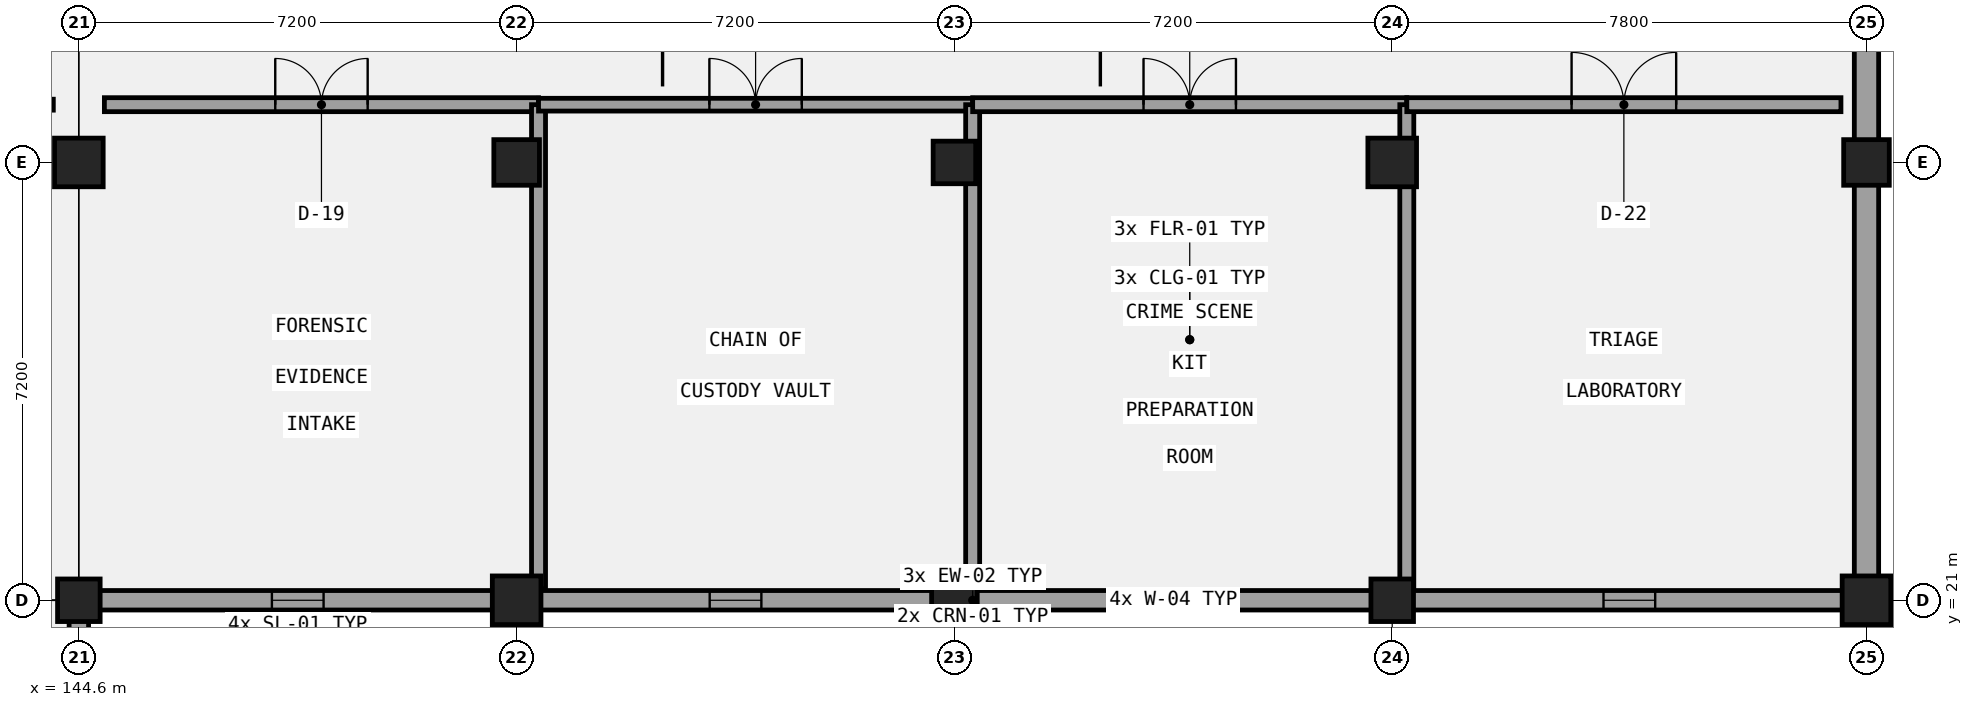
"""IFC4 building model, lengths in metres.
Left out: names, types, materials, properties, quantities, classifications, styles, units other than length and angle.
Written with IfcOpenShell. Run it as: python <this file> out.ifc"""

import sys

from ifc_helpers import new_model, si_unit, direction, frame, frame_2d, origin, origin_2d, place, context, subcontext, project, spatial, rectangle, extrude, element, fill, save


model = new_model("IFC4")
c1 = context("Model", 3, precision=1e-05, world=origin(), true_north=direction((0.0, 1.0)))
c2 = subcontext(c1, "Body", "Model", "MODEL_VIEW")
j1 = project(units=[si_unit("LENGTHUNIT", "METRE"), si_unit("PLANEANGLEUNIT", "RADIAN")], contexts=[c1])
p1 = place(None, origin())
s1 = spatial("IfcSite", under=j1, at=p1, CompositionType="ELEMENT")
p2 = place(p1, origin())
s2 = spatial("IfcBuilding", under=s1, at=p2, CompositionType="ELEMENT")
p3 = place(p2, origin())
s3 = spatial("IfcBuildingStorey", under=s2, at=p3, CompositionType="ELEMENT", Elevation=0.0)
p4 = place(p3, frame((144.6, 21.0, 0.0), z_axis=(0.0, 0.0, 1.0), x_axis=(1.0, 0.0, 0.0)))
e1 = element("IfcColumn", 1, at=p4, inside=s3, PredefinedType="COLUMN", context=c2, shape_type="SweptSolid", body=[
    extrude(rectangle(XDim=0.7, YDim=0.7, at=origin_2d()), origin(), (0.0, 0.0, 1.0), 5.4),
])
p5 = place(p3, frame((144.6, 28.2, 0.0), z_axis=(0.0, 0.0, 1.0), x_axis=(1.0, 0.0, 0.0)))
e2 = element("IfcColumn", 2, at=p5, inside=s3, PredefinedType="COLUMN", context=c2, shape_type="SweptSolid", body=[
    extrude(rectangle(XDim=0.8, YDim=0.8, at=origin_2d()), origin(), (0.0, 0.0, 1.0), 5.4),
])
p6 = place(p3, frame((151.8, 21.0, -0.32), z_axis=(0.0, 0.0, 1.0), x_axis=(1.0, 0.0, 0.0)))
e3 = element("IfcColumn", 3, at=p6, inside=s3, PredefinedType="COLUMN", context=c2, shape_type="SweptSolid", body=[
    extrude(rectangle(XDim=0.8, YDim=0.8, at=origin_2d()), origin(), (0.0, 0.0, 1.0), 5.72),
])
p7 = place(p3, frame((151.8, 28.2, 0.0), z_axis=(0.0, 0.0, 1.0), x_axis=(1.0, 0.0, 0.0)))
e4 = element("IfcColumn", 4, at=p7, inside=s3, PredefinedType="COLUMN", context=c2, shape_type="SweptSolid", body=[
    extrude(rectangle(XDim=0.75, YDim=0.75, at=origin_2d()), origin(), (0.0, 0.0, 1.0), 5.4),
])
p8 = place(p3, frame((159.0, 21.0, -0.32), z_axis=(0.0, 0.0, 1.0), x_axis=(1.0, 0.0, 0.0)))
e5 = element("IfcColumn", 5, at=p8, inside=s3, PredefinedType="COLUMN", context=c2, shape_type="SweptSolid", body=[
    extrude(rectangle(XDim=0.75, YDim=0.75, at=origin_2d()), origin(), (0.0, 0.0, 1.0), 5.72),
])
p9 = place(p3, frame((159.0, 28.2, 0.0), z_axis=(0.0, 0.0, 1.0), x_axis=(1.0, 0.0, 0.0)))
e6 = element("IfcColumn", 6, at=p9, inside=s3, PredefinedType="COLUMN", context=c2, shape_type="SweptSolid", body=[
    extrude(rectangle(XDim=0.7, YDim=0.7, at=origin_2d()), origin(), (0.0, 0.0, 1.0), 5.4),
])
p10 = place(p3, frame((166.2, 21.0, -0.32), z_axis=(0.0, 0.0, 1.0), x_axis=(1.0, 0.0, 0.0)))
e7 = element("IfcColumn", 7, at=p10, inside=s3, PredefinedType="COLUMN", context=c2, shape_type="SweptSolid", body=[
    extrude(rectangle(XDim=0.7, YDim=0.7, at=origin_2d()), origin(), (0.0, 0.0, 1.0), 5.72),
])
p11 = place(p3, frame((166.2, 28.2, 0.0), z_axis=(0.0, 0.0, 1.0), x_axis=(1.0, 0.0, 0.0)))
e8 = element("IfcColumn", 8, at=p11, inside=s3, PredefinedType="COLUMN", context=c2, shape_type="SweptSolid", body=[
    extrude(rectangle(XDim=0.8, YDim=0.8, at=origin_2d()), origin(), (0.0, 0.0, 1.0), 5.4),
])
p12 = place(p3, frame((174.0, 21.0, -0.32), z_axis=(0.0, 0.0, 1.0), x_axis=(1.0, 0.0, 0.0)))
e9 = element("IfcColumn", 9, at=p12, inside=s3, PredefinedType="COLUMN", context=c2, shape_type="SweptSolid", body=[
    extrude(rectangle(XDim=0.8, YDim=0.8, at=origin_2d()), origin(), (0.0, 0.0, 1.0), 5.72),
])
p13 = place(p3, frame((174.0, 28.2, -0.32), z_axis=(0.0, 0.0, 1.0), x_axis=(1.0, 0.0, 0.0)))
e10 = element("IfcColumn", 10, at=p13, inside=s3, PredefinedType="COLUMN", context=c2, shape_type="SweptSolid", body=[
    extrude(rectangle(XDim=0.75, YDim=0.75, at=origin_2d()), origin(), (0.0, 0.0, 1.0), 5.72),
])
p14 = place(p3, frame((144.6, 0.16, 0.0), z_axis=(0.0, 0.0, 1.0), x_axis=(0.0, 1.0, 0.0)))
e11 = element("IfcWall", 11, at=p14, inside=s3, PredefinedType="SOLIDWALL", context=c2, shape_type="SweptSolid", body=[
    extrude(rectangle(XDim=20.68, YDim=0.32, at=frame_2d((10.34, 0.0))), origin(), (0.0, 0.0, 1.0), 4.12),
])
p15 = place(p14, frame((9.34, 0.0, 0.0)))
e12 = element("IfcOpeningElement", 12, at=p15, cuts=e11, PredefinedType="OPENING", context=c2, shape_type="SweptSolid", body=[
    extrude(rectangle(XDim=2.0, YDim=2.6, at=frame_2d((1.0, 1.3))), frame((0.0, 0.17, 0.0), z_axis=(0.0, -1.0, 0.0), x_axis=(1.0, 0.0, 0.0)), (0.0, 0.0, 1.0), 0.34),
])
p16 = place(p14, frame((2.795, 0.0, 1.0)))
e13 = element("IfcOpeningElement", 13, at=p16, cuts=e11, PredefinedType="OPENING", context=c2, shape_type="SweptSolid", body=[
    extrude(rectangle(XDim=0.85, YDim=1.9, at=frame_2d((0.425, 0.95))), frame((0.0, 0.17, 0.0), z_axis=(0.0, -1.0, 0.0), x_axis=(1.0, 0.0, 0.0)), (0.0, 0.0, 1.0), 0.34),
])
p17 = place(p14, frame((16.735, 0.0, 1.0)))
e14 = element("IfcOpeningElement", 14, at=p17, cuts=e11, PredefinedType="OPENING", context=c2, shape_type="SweptSolid", body=[
    extrude(rectangle(XDim=0.85, YDim=1.9, at=frame_2d((0.425, 0.95))), frame((0.0, 0.17, 0.0), z_axis=(0.0, -1.0, 0.0), x_axis=(1.0, 0.0, 0.0)), (0.0, 0.0, 1.0), 0.34),
])
p18 = place(p3, frame((144.44, 21.0, 0.0), z_axis=(0.0, 0.0, 1.0), x_axis=(1.0, 0.0, 0.0)))
e15 = element("IfcWall", 15, at=p18, inside=s3, PredefinedType="SOLIDWALL", context=c2, shape_type="SweptSolid", body=[
    extrude(rectangle(XDim=29.72, YDim=0.32, at=frame_2d((14.86, 0.0))), origin(), (0.0, 0.0, 1.0), 3.35),
])
p19 = place(p18, frame((3.335, 0.0, 1.0)))
e16 = element("IfcOpeningElement", 16, at=p19, cuts=e15, PredefinedType="OPENING", context=c2, shape_type="SweptSolid", body=[
    extrude(rectangle(XDim=0.85, YDim=2.15, at=frame_2d((0.425, 1.075))), frame((0.0, 0.17, 0.0), z_axis=(0.0, -1.0, 0.0), x_axis=(1.0, 0.0, 0.0)), (0.0, 0.0, 1.0), 0.34),
])
p20 = place(p18, frame((10.535, 0.0, 1.0)))
e17 = element("IfcOpeningElement", 17, at=p20, cuts=e15, PredefinedType="OPENING", context=c2, shape_type="SweptSolid", body=[
    extrude(rectangle(XDim=0.85, YDim=2.15, at=frame_2d((0.425, 1.075))), frame((0.0, 0.17, 0.0), z_axis=(0.0, -1.0, 0.0), x_axis=(1.0, 0.0, 0.0)), (0.0, 0.0, 1.0), 0.34),
])
p21 = place(p18, frame((17.735, 0.0, 1.0)))
e18 = element("IfcOpeningElement", 18, at=p21, cuts=e15, PredefinedType="OPENING", context=c2, shape_type="SweptSolid", body=[
    extrude(rectangle(XDim=0.85, YDim=2.15, at=frame_2d((0.425, 1.075))), frame((0.0, 0.17, 0.0), z_axis=(0.0, -1.0, 0.0), x_axis=(1.0, 0.0, 0.0)), (0.0, 0.0, 1.0), 0.34),
])
p22 = place(p18, frame((25.235, 0.0, 1.0)))
e19 = element("IfcOpeningElement", 19, at=p22, cuts=e15, PredefinedType="OPENING", context=c2, shape_type="SweptSolid", body=[
    extrude(rectangle(XDim=0.85, YDim=2.15, at=frame_2d((0.425, 1.075))), frame((0.0, 0.17, 0.0), z_axis=(0.0, -1.0, 0.0), x_axis=(1.0, 0.0, 0.0)), (0.0, 0.0, 1.0), 0.34),
])
p23 = place(p3, frame((174.0, 21.2, 0.0), z_axis=(0.0, 0.0, 1.0), x_axis=(0.0, 1.0, 0.0)))
e20 = element("IfcWall", 20, at=p23, inside=s3, PredefinedType="SOLIDWALL", context=c2, shape_type="SweptSolid", body=[
    extrude(rectangle(XDim=57.2, YDim=0.4, at=frame_2d((28.6, 0.0))), origin(), (0.0, 0.0, 1.0), 4.37),
])
p24 = place(p3, frame((137.133, 29.15, 0.0), z_axis=(0.0, 0.0, 1.0), x_axis=(1.0, 0.0, 0.0)))
e21 = element("IfcWall", 21, at=p24, inside=s3, PredefinedType="PARTITIONING", context=c2, shape_type="SweptSolid", body=[
    extrude(rectangle(XDim=7.047, YDim=0.18, at=frame_2d((3.523, 0.0))), origin(), (0.0, 0.0, 1.0), 5.12),
])
p25 = place(p24, frame((2.844, 0.0, 0.0)))
e22 = element("IfcOpeningElement", 22, at=p25, cuts=e21, PredefinedType="OPENING", context=c2, shape_type="SweptSolid", body=[
    extrude(rectangle(XDim=1.36, YDim=2.22, at=frame_2d((0.68, 1.11))), frame((0.0, 0.1, 0.0), z_axis=(0.0, -1.0, 0.0), x_axis=(1.0, 0.0, 0.0)), (0.0, 0.0, 1.0), 0.2),
])
p26 = place(p3, frame((145.02, 29.15, 0.0), z_axis=(0.0, 0.0, 1.0), x_axis=(1.0, 0.0, 0.0)))
e23 = element("IfcWall", 23, at=p26, inside=s3, PredefinedType="PARTITIONING", context=c2, shape_type="SweptSolid", body=[
    extrude(rectangle(XDim=7.14, YDim=0.23, at=frame_2d((3.57, 0.0))), origin(), (0.0, 0.0, 1.0), 5.12),
])
p27 = place(p26, frame((2.81, 0.0, 0.0)))
e24 = element("IfcOpeningElement", 24, at=p27, cuts=e23, PredefinedType="OPENING", context=c2, shape_type="SweptSolid", body=[
    extrude(rectangle(XDim=1.52, YDim=2.1, at=frame_2d((0.76, 1.05))), frame((0.0, 0.125, 0.0), z_axis=(0.0, -1.0, 0.0), x_axis=(1.0, 0.0, 0.0)), (0.0, 0.0, 1.0), 0.25),
])
p28 = place(p3, frame((152.16, 21.18, 0.0), z_axis=(0.0, 0.0, 1.0), x_axis=(0.0, 1.0, 0.0)))
e25 = element("IfcWall", 25, at=p28, inside=s3, PredefinedType="PARTITIONING", context=c2, shape_type="SweptSolid", body=[
    extrude(rectangle(XDim=7.97, YDim=0.23, at=frame_2d((3.985, 0.0))), origin(), (0.0, 0.0, 1.0), 4.47),
])
p29 = place(p3, frame((152.16, 29.15, 0.0), z_axis=(0.0, 0.0, 1.0), x_axis=(1.0, 0.0, 0.0)))
e26 = element("IfcWall", 26, at=p29, inside=s3, PredefinedType="PARTITIONING", context=c2, shape_type="SweptSolid", body=[
    extrude(rectangle(XDim=7.14, YDim=0.21, at=frame_2d((3.57, 0.0))), origin(), (0.0, 0.0, 1.0), 5.12),
])
p30 = place(p29, frame((2.81, 0.0, 0.0)))
e27 = element("IfcOpeningElement", 27, at=p30, cuts=e26, PredefinedType="OPENING", context=c2, shape_type="SweptSolid", body=[
    extrude(rectangle(XDim=1.52, YDim=2.22, at=frame_2d((0.76, 1.11))), frame((0.0, 0.115, 0.0), z_axis=(0.0, -1.0, 0.0), x_axis=(1.0, 0.0, 0.0)), (0.0, 0.0, 1.0), 0.23),
])
p31 = place(p3, frame((159.3, 21.18, 0.0), z_axis=(0.0, 0.0, 1.0), x_axis=(0.0, 1.0, 0.0)))
e28 = element("IfcWall", 28, at=p31, inside=s3, PredefinedType="PARTITIONING", context=c2, shape_type="SweptSolid", body=[
    extrude(rectangle(XDim=7.97, YDim=0.23, at=frame_2d((3.985, 0.0))), origin(), (0.0, 0.0, 1.0), 4.37),
])
p32 = place(p3, frame((159.3, 29.15, 0.0), z_axis=(0.0, 0.0, 1.0), x_axis=(1.0, 0.0, 0.0)))
e29 = element("IfcWall", 29, at=p32, inside=s3, PredefinedType="PARTITIONING", context=c2, shape_type="SweptSolid", body=[
    extrude(rectangle(XDim=7.14, YDim=0.23, at=frame_2d((3.57, 0.0))), origin(), (0.0, 0.0, 1.0), 5.12),
])
p33 = place(p32, frame((2.81, 0.0, 0.0)))
e30 = element("IfcOpeningElement", 30, at=p33, cuts=e29, PredefinedType="OPENING", context=c2, shape_type="SweptSolid", body=[
    extrude(rectangle(XDim=1.52, YDim=2.35, at=frame_2d((0.76, 1.175))), frame((0.0, 0.125, 0.0), z_axis=(0.0, -1.0, 0.0), x_axis=(1.0, 0.0, 0.0)), (0.0, 0.0, 1.0), 0.25),
])
p34 = place(p3, frame((166.44, 21.18, 0.0), z_axis=(0.0, 0.0, 1.0), x_axis=(0.0, 1.0, 0.0)))
e31 = element("IfcWall", 31, at=p34, inside=s3, PredefinedType="PARTITIONING", context=c2, shape_type="SweptSolid", body=[
    extrude(rectangle(XDim=7.97, YDim=0.23, at=frame_2d((3.985, 0.0))), origin(), (0.0, 0.0, 1.0), 4.32),
])
p35 = place(p3, frame((166.44, 29.15, 0.0), z_axis=(0.0, 0.0, 1.0), x_axis=(1.0, 0.0, 0.0)))
e32 = element("IfcWall", 32, at=p35, inside=s3, PredefinedType="PARTITIONING", context=c2, shape_type="SweptSolid", body=[
    extrude(rectangle(XDim=7.14, YDim=0.23, at=frame_2d((3.57, 0.0))), origin(), (0.0, 0.0, 1.0), 5.12),
])
p36 = place(p35, frame((2.71, 0.0, 0.0)))
e33 = element("IfcOpeningElement", 33, at=p36, cuts=e32, PredefinedType="OPENING", context=c2, shape_type="SweptSolid", body=[
    extrude(rectangle(XDim=1.72, YDim=2.1, at=frame_2d((0.86, 1.05))), frame((0.0, 0.125, 0.0), z_axis=(0.0, -1.0, 0.0), x_axis=(1.0, 0.0, 0.0)), (0.0, 0.0, 1.0), 0.25),
])
p37 = place(p19, origin())
e34 = element("IfcWindow", 34, at=p37, inside=s3, PartitioningType="SINGLE_PANEL", PredefinedType="WINDOW", context=c2, shape_type="SweptSolid", body=[
    extrude(rectangle(XDim=0.85, YDim=2.15, at=frame_2d((0.425, 1.075))), frame((0.0, 0.03, 0.0), z_axis=(0.0, -1.0, 0.0), x_axis=(1.0, 0.0, 0.0)), (0.0, 0.0, 1.0), 0.06),
])
fill(e16, e34)
p38 = place(p20, origin())
e35 = element("IfcWindow", 35, at=p38, inside=s3, PartitioningType="SINGLE_PANEL", PredefinedType="WINDOW", context=c2, shape_type="SweptSolid", body=[
    extrude(rectangle(XDim=0.85, YDim=2.15, at=frame_2d((0.425, 1.075))), frame((0.0, 0.03, 0.0), z_axis=(0.0, -1.0, 0.0), x_axis=(1.0, 0.0, 0.0)), (0.0, 0.0, 1.0), 0.06),
])
fill(e17, e35)
p39 = place(p21, origin())
e36 = element("IfcWindow", 36, at=p39, inside=s3, PartitioningType="SINGLE_PANEL", PredefinedType="WINDOW", context=c2, shape_type="SweptSolid", body=[
    extrude(rectangle(XDim=0.85, YDim=2.15, at=frame_2d((0.425, 1.075))), frame((0.0, 0.03, 0.0), z_axis=(0.0, -1.0, 0.0), x_axis=(1.0, 0.0, 0.0)), (0.0, 0.0, 1.0), 0.06),
])
fill(e18, e36)
p40 = place(p22, origin())
e37 = element("IfcWindow", 37, at=p40, inside=s3, PartitioningType="SINGLE_PANEL", PredefinedType="WINDOW", context=c2, shape_type="SweptSolid", body=[
    extrude(rectangle(XDim=0.85, YDim=2.15, at=frame_2d((0.425, 1.075))), frame((0.0, 0.03, 0.0), z_axis=(0.0, -1.0, 0.0), x_axis=(1.0, 0.0, 0.0)), (0.0, 0.0, 1.0), 0.06),
])
fill(e19, e37)
p41 = place(p27, frame((1.52, 0.0, 0.0), z_axis=(0.0, 0.0, 1.0), x_axis=(-1.0, 0.0, 0.0)))
e38 = element("IfcDoor", 38, at=p41, inside=s3, OperationType="DOUBLE_DOOR_SINGLE_SWING", PredefinedType="DOOR", context=c2, shape_type="SweptSolid", body=[
    extrude(rectangle(XDim=1.52, YDim=2.1, at=frame_2d((0.76, 1.05))), frame((0.0, 0.025, 0.0), z_axis=(0.0, -1.0, 0.0), x_axis=(1.0, 0.0, 0.0)), (0.0, 0.0, 1.0), 0.05),
])
fill(e24, e38)
p42 = place(p30, frame((1.52, 0.0, 0.0), z_axis=(0.0, 0.0, 1.0), x_axis=(-1.0, 0.0, 0.0)))
e39 = element("IfcDoor", 39, at=p42, inside=s3, OperationType="DOUBLE_DOOR_SINGLE_SWING", PredefinedType="DOOR", context=c2, shape_type="SweptSolid", body=[
    extrude(rectangle(XDim=1.52, YDim=2.22, at=frame_2d((0.76, 1.11))), frame((0.0, 0.025, 0.0), z_axis=(0.0, -1.0, 0.0), x_axis=(1.0, 0.0, 0.0)), (0.0, 0.0, 1.0), 0.05),
])
fill(e27, e39)
p43 = place(p33, frame((1.52, 0.0, 0.0), z_axis=(0.0, 0.0, 1.0), x_axis=(-1.0, 0.0, 0.0)))
e40 = element("IfcDoor", 40, at=p43, inside=s3, OperationType="DOUBLE_DOOR_SINGLE_SWING", PredefinedType="DOOR", context=c2, shape_type="SweptSolid", body=[
    extrude(rectangle(XDim=1.52, YDim=2.35, at=frame_2d((0.76, 1.175))), frame((0.0, 0.025, 0.0), z_axis=(0.0, -1.0, 0.0), x_axis=(1.0, 0.0, 0.0)), (0.0, 0.0, 1.0), 0.05),
])
fill(e30, e40)
p44 = place(p36, frame((1.72, 0.0, 0.0), z_axis=(0.0, 0.0, 1.0), x_axis=(-1.0, 0.0, 0.0)))
e41 = element("IfcDoor", 41, at=p44, inside=s3, OperationType="DOUBLE_DOOR_SINGLE_SWING", PredefinedType="DOOR", context=c2, shape_type="SweptSolid", body=[
    extrude(rectangle(XDim=1.72, YDim=2.1, at=frame_2d((0.86, 1.05))), frame((0.0, 0.025, 0.0), z_axis=(0.0, -1.0, 0.0), x_axis=(1.0, 0.0, 0.0)), (0.0, 0.0, 1.0), 0.05),
])
fill(e33, e41)
save(model, sys.argv[1])
